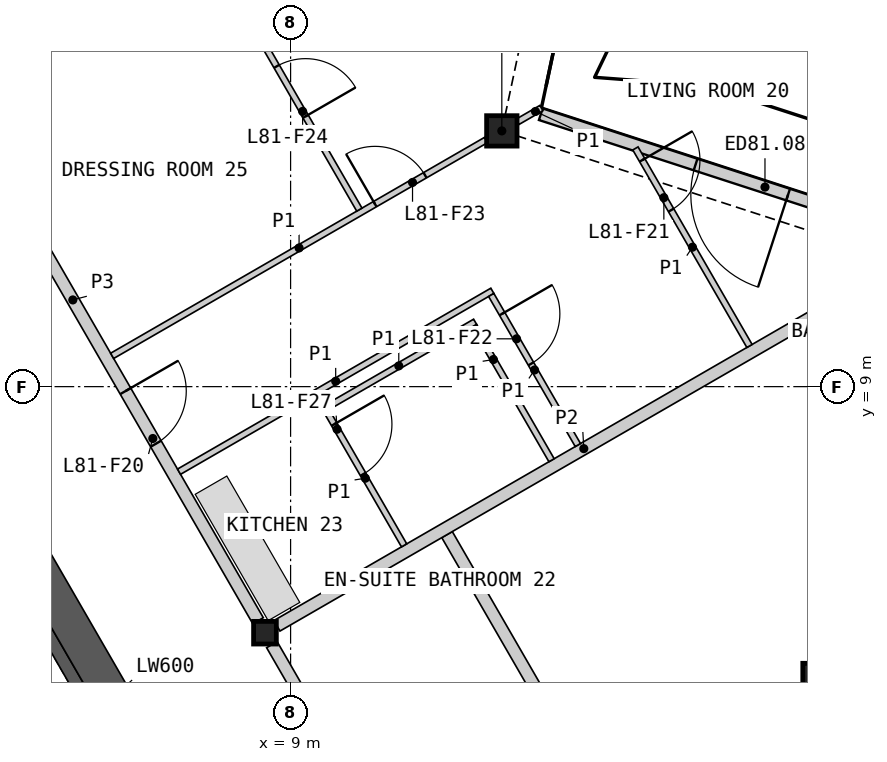
"""IFC4 building model, lengths in metres.
Left out: names, types, materials, properties, quantities, classifications, styles, units other than length and angle.
Written with IfcOpenShell. Run it as: python <this file> out.ifc"""

import sys

from ifc_helpers import new_model, si_unit, direction, frame, frame_2d, origin, origin_2d, place, context, subcontext, project, spatial, polyline, rectangle, hollow_rectangle, i_section, outline, extrude, element, fill, save


model = new_model("IFC4")
c1 = context("Model", 3, precision=1e-05, world=origin(), true_north=direction((0.0, 1.0)))
c2 = subcontext(c1, "Body", "Model", "MODEL_VIEW")
j1 = project(units=[si_unit("LENGTHUNIT", "METRE"), si_unit("PLANEANGLEUNIT", "RADIAN")], contexts=[c1])
p1 = place(None, origin())
s1 = spatial("IfcSite", under=j1, at=p1, CompositionType="ELEMENT")
p2 = place(p1, origin())
s2 = spatial("IfcBuilding", under=s1, at=p2, CompositionType="ELEMENT")
p3 = place(p2, frame((0.0, 0.0, 364.4)))
s3 = spatial("IfcBuildingStorey", under=s2, at=p3, CompositionType="ELEMENT", Elevation=364.4)
for number, where, z_axis, x_axis in (
    (1, (17.674, 4.199, 0.0), (0.0, 0.0, 1.0), (1.0, 0.0, 0.0)),
    (2, (12.474, 13.206, 0.0), (0.0, 0.0, 1.0), (1.0, 0.0, 0.0)),
):
    element("IfcColumn", number, at=place(p3, frame(where, z_axis=z_axis, x_axis=x_axis)), inside=s3, PredefinedType="COLUMN", context=c2, shape_type="SweptSolid", body=[
        extrude(hollow_rectangle(XDim=0.5, YDim=0.5, WallThickness=0.03, at=origin_2d()), origin(), (0.0, 0.0, 1.0), 3.4),
    ])
p4 = place(p3, frame((8.578, 4.953, 0.0), z_axis=(0.0, 0.0, 1.0), x_axis=(1.0, 0.0, 0.0)))
e3 = element("IfcColumn", 3, at=p4, inside=s3, PredefinedType="COLUMN", context=c2, shape_type="SweptSolid", body=[
    extrude(i_section(OverallWidth=0.374, OverallDepth=0.372, WebThickness=0.016, FlangeThickness=0.026, at=origin_2d()), origin(), (0.0, 0.0, 1.0), 3.4),
])
p5 = place(p3, frame((19.467, 11.416, 0.0), z_axis=(0.0, 0.0, 1.0), x_axis=(-0.951057706878, 0.309013330114, 0.0)))
e4 = element("IfcWall", 4, at=p5, inside=s3, PredefinedType="SOLIDWALL", context=c2, shape_type="SweptSolid", body=[
    extrude(rectangle(XDim=6.678, YDim=0.2, at=frame_2d((3.339, 0.0))), origin(), (0.0, 0.0, 1.0), 2.634),
])
p6 = place(p5, frame((2.402, 0.0, 0.0)))
e5 = element("IfcOpeningElement", 5, at=p6, cuts=e4, PredefinedType="OPENING", context=c2, shape_type="SweptSolid", body=[
    extrude(rectangle(XDim=1.6, YDim=2.25, at=frame_2d((0.8, 1.125))), frame((0.0, 0.11, 0.0), z_axis=(0.0, -1.0, 0.0), x_axis=(1.0, 0.0, 0.0)), (0.0, 0.0, 1.0), 0.22),
])
p7 = place(p3, origin())
e6 = element("IfcWall", 6, at=p7, inside=s3, PredefinedType="SHEAR", context=c2, shape_type="SweptSolid", body=[
    extrude(outline(polyline([(1.561, 6.097), (3.731, 7.35), (8.231, -0.444), (6.061, -1.697), (5.96, -1.524), (7.952, -0.374), (6.952, 1.358), (4.96, 0.208), (4.861, 0.381), (6.852, 1.531), (5.852, 3.263), (3.861, 2.113), (3.76, 2.287), (5.752, 3.437), (4.752, 5.169), (2.76, 4.019), (2.66, 4.192), (4.652, 5.342), (3.652, 7.074), (1.66, 5.924), (1.561, 6.097)])), origin(), (0.0, 0.0, 1.0), 3.1),
])
p8 = place(p3, frame((5.817, -1.476, 0.0), z_axis=(0.0, 0.0, 1.0), x_axis=(-0.500002616675, 0.866023893041, 0.0)))
e7 = element("IfcWall", 7, at=p8, inside=s3, PredefinedType="SOLIDWALL", context=c2, shape_type="SweptSolid", body=[
    extrude(rectangle(XDim=8.373, YDim=0.2, at=frame_2d((4.187, 0.0))), origin(), (0.0, 0.0, 1.0), 3.1),
])
p9 = place(p8, frame((0.337, 0.0, 0.0)))
e8 = element("IfcOpeningElement", 8, at=p9, cuts=e7, PredefinedType="OPENING", context=c2, shape_type="SweptSolid", body=[
    extrude(rectangle(XDim=1.1, YDim=2.1, at=frame_2d((0.55, 1.05))), frame((0.0, 0.11, 0.0), z_axis=(0.0, -1.0, 0.0), x_axis=(1.0, 0.0, 0.0)), (0.0, 0.0, 1.0), 0.22),
])
p10 = place(p8, frame((2.537, 0.0, 0.0)))
e9 = element("IfcOpeningElement", 9, at=p10, cuts=e7, PredefinedType="OPENING", context=c2, shape_type="SweptSolid", body=[
    extrude(rectangle(XDim=1.1, YDim=2.1, at=frame_2d((0.55, 1.05))), frame((0.0, 0.11, 0.0), z_axis=(0.0, -1.0, 0.0), x_axis=(1.0, 0.0, 0.0)), (0.0, 0.0, 1.0), 0.22),
])
p11 = place(p8, frame((4.737, 0.0, 0.0)))
e10 = element("IfcOpeningElement", 10, at=p11, cuts=e7, PredefinedType="OPENING", context=c2, shape_type="SweptSolid", body=[
    extrude(rectangle(XDim=1.1, YDim=2.1, at=frame_2d((0.55, 1.05))), frame((0.0, 0.11, 0.0), z_axis=(0.0, -1.0, 0.0), x_axis=(1.0, 0.0, 0.0)), (0.0, 0.0, 1.0), 0.22),
])
p12 = place(p8, frame((7.037, 0.0, 0.0)))
e11 = element("IfcOpeningElement", 11, at=p12, cuts=e7, PredefinedType="OPENING", context=c2, shape_type="SweptSolid", body=[
    extrude(rectangle(XDim=0.9, YDim=2.1, at=frame_2d((0.45, 1.05))), frame((0.0, 0.11, 0.0), z_axis=(0.0, -1.0, 0.0), x_axis=(1.0, 0.0, 0.0)), (0.0, 0.0, 1.0), 0.22),
])
p13 = place(p3, frame((8.686, -0.634, 0.0), z_axis=(0.0, 0.0, 1.0), x_axis=(-0.50001836461, 0.866014800712, 0.0)))
e12 = element("IfcWall", 12, at=p13, inside=s3, PredefinedType="SHEAR", context=c2, shape_type="SweptSolid", body=[
    extrude(rectangle(XDim=10.451, YDim=0.6, at=frame_2d((5.225, 0.0))), origin(), (0.0, 0.0, 1.0), 3.1),
])
p14 = place(p3, frame((4.403, 12.185, 0.0), z_axis=(0.0, 0.0, 1.0), x_axis=(0.499992155518, -0.866029932751, 0.0)))
e13 = element("IfcWall", 13, at=p14, inside=s3, PredefinedType="PARTITIONING", context=c2, shape_type="SweptSolid", body=[
    extrude(rectangle(XDim=8.123, YDim=0.2, at=frame_2d((4.062, 0.0))), origin(), (0.0, 0.0, 1.0), 3.1),
])
p15 = place(p14, frame((3.762, 0.0, 0.0)))
e14 = element("IfcOpeningElement", 14, at=p15, cuts=e13, PredefinedType="OPENING", context=c2, shape_type="SweptSolid", body=[
    extrude(rectangle(XDim=1.0, YDim=2.1, at=frame_2d((0.5, 1.05))), frame((0.0, 0.11, 0.0), z_axis=(0.0, -1.0, 0.0), x_axis=(1.0, 0.0, 0.0)), (0.0, 0.0, 1.0), 0.22),
])
p16 = place(p3, frame((8.692, 4.756, 0.0), z_axis=(0.0, 0.0, 1.0), x_axis=(0.500001682468, -0.866024432409, 0.0)))
e15 = element("IfcWall", 15, at=p16, inside=s3, PredefinedType="PARTITIONING", context=c2, shape_type="SweptSolid", body=[
    extrude(rectangle(XDim=8.124, YDim=0.2, at=frame_2d((4.062, 0.0))), origin(), (0.0, 0.0, 1.0), 3.1),
])
p17 = place(p16, frame((3.587, 0.0, 0.0)))
e16 = element("IfcOpeningElement", 16, at=p17, cuts=e15, PredefinedType="OPENING", context=c2, shape_type="SweptSolid", body=[
    extrude(rectangle(XDim=0.95, YDim=2.1, at=frame_2d((0.475, 1.05))), frame((0.0, 0.11, 0.0), z_axis=(0.0, -1.0, 0.0), x_axis=(1.0, 0.0, 0.0)), (0.0, 0.0, 1.0), 0.22),
])
p18 = place(p3, frame((11.573, 6.566, 0.0), z_axis=(0.0, 0.0, 1.0), x_axis=(0.499993542657, -0.866029131901, 0.0)))
e17 = element("IfcWall", 17, at=p18, inside=s3, PredefinedType="PARTITIONING", context=c2, shape_type="SweptSolid", body=[
    extrude(rectangle(XDim=14.994, YDim=0.2, at=frame_2d((7.497, 0.0))), origin(), (0.0, 0.0, 1.0), 2.33),
])
p19 = place(p18, frame((5.166, 0.0, 0.0)))
e18 = element("IfcOpeningElement", 18, at=p19, cuts=e17, PredefinedType="OPENING", context=c2, shape_type="SweptSolid", body=[
    extrude(rectangle(XDim=0.95, YDim=2.1, at=frame_2d((0.475, 1.05))), frame((0.0, 0.11, 0.0), z_axis=(0.0, -1.0, 0.0), x_axis=(1.0, 0.0, 0.0)), (0.0, 0.0, 1.0), 0.22),
])
p20 = place(p3, frame((8.775, 5.066, 0.0), z_axis=(0.0, 0.0, 1.0), x_axis=(0.866023724155, 0.500002909193, 0.0)))
e19 = element("IfcWall", 19, at=p20, inside=s3, PredefinedType="PARTITIONING", context=c2, shape_type="SweptSolid", body=[
    extrude(rectangle(XDim=11.655, YDim=0.2, at=frame_2d((5.827, 0.0))), origin(), (0.0, 0.0, 1.0), 2.33),
])
p21 = place(p3, frame((3.465, 14.01, 0.0), z_axis=(0.0, 0.0, 1.0), x_axis=(0.866032376801, 0.499987922186, 0.0)))
e20 = element("IfcWall", 20, at=p21, inside=s3, PredefinedType="PARTITIONING", context=c2, shape_type="SweptSolid", body=[
    extrude(rectangle(XDim=11.782, YDim=0.1, at=frame_2d((5.891, 0.0))), origin(), (0.0, 0.0, 1.0), 2.33),
])
p22 = place(p21, frame((6.67, 0.0, 0.0)))
e21 = element("IfcOpeningElement", 21, at=p22, cuts=e20, PredefinedType="OPENING", context=c2, shape_type="SweptSolid", body=[
    extrude(rectangle(XDim=0.95, YDim=2.1, at=frame_2d((0.475, 1.05))), frame((0.0, 0.06, 0.0), z_axis=(0.0, -1.0, 0.0), x_axis=(1.0, 0.0, 0.0)), (0.0, 0.0, 1.0), 0.12),
])
p23 = place(p3, frame((6.065, 9.506, 0.0), z_axis=(0.0, 0.0, 1.0), x_axis=(0.866018949465, 0.500011179042, 0.0)))
e22 = element("IfcWall", 22, at=p23, inside=s3, PredefinedType="PARTITIONING", context=c2, shape_type="SweptSolid", body=[
    extrude(rectangle(XDim=7.1, YDim=0.1, at=frame_2d((3.55, 0.0))), origin(), (0.0, 0.0, 1.0), 2.33),
])
p24 = place(p23, frame((4.992, 0.0, 0.0)))
e23 = element("IfcOpeningElement", 23, at=p24, cuts=e22, PredefinedType="OPENING", context=c2, shape_type="SweptSolid", body=[
    extrude(rectangle(XDim=0.95, YDim=2.1, at=frame_2d((0.475, 1.05))), frame((0.0, 0.06, 0.0), z_axis=(0.0, -1.0, 0.0), x_axis=(1.0, 0.0, 0.0)), (0.0, 0.0, 1.0), 0.12),
])
p25 = place(p3, frame((7.165, 7.601, 0.0), z_axis=(0.0, 0.0, 1.0), x_axis=(0.866017493347, 0.500013701029, 0.0)))
e24 = element("IfcWall", 24, at=p25, inside=s3, PredefinedType="PARTITIONING", context=c2, shape_type="SweptSolid", body=[
    extrude(rectangle(XDim=5.95, YDim=0.1, at=frame_2d((2.975, 0.0))), origin(), (0.0, 0.0, 1.0), 2.33),
])
p26 = place(p3, frame((7.581, 16.328, 0.0), z_axis=(0.0, 0.0, 1.0), x_axis=(0.500005610874, -0.86602216432, 0.0)))
e25 = element("IfcWall", 25, at=p26, inside=s3, PredefinedType="PARTITIONING", context=c2, shape_type="SweptSolid", body=[
    extrude(rectangle(XDim=5.1, YDim=0.1, at=frame_2d((2.55, 0.0))), origin(), (0.0, 0.0, 1.0), 2.33),
])
p27 = place(p26, frame((2.379, 0.0, 0.0)))
e26 = element("IfcOpeningElement", 26, at=p27, cuts=e25, PredefinedType="OPENING", context=c2, shape_type="SweptSolid", body=[
    extrude(rectangle(XDim=0.95, YDim=2.1, at=frame_2d((0.475, 1.05))), frame((0.0, 0.06, 0.0), z_axis=(0.0, -1.0, 0.0), x_axis=(1.0, 0.0, 0.0)), (0.0, 0.0, 1.0), 0.12),
])
p28 = place(p3, frame((14.671, 12.918, 0.0), z_axis=(0.0, 0.0, 1.0), x_axis=(0.499981580887, -0.866036037803, 0.0)))
e27 = element("IfcWall", 27, at=p28, inside=s3, PredefinedType="PARTITIONING", context=c2, shape_type="SweptSolid", body=[
    extrude(rectangle(XDim=3.752, YDim=0.1, at=frame_2d((1.876, 0.0))), origin(), (0.0, 0.0, 1.0), 2.33),
])
p29 = place(p28, frame((0.222, 0.0, 0.0)))
e28 = element("IfcOpeningElement", 28, at=p29, cuts=e27, PredefinedType="OPENING", context=c2, shape_type="SweptSolid", body=[
    extrude(rectangle(XDim=0.95, YDim=2.1, at=frame_2d((0.475, 1.05))), frame((0.0, 0.06, 0.0), z_axis=(0.0, -1.0, 0.0), x_axis=(1.0, 0.0, 0.0)), (0.0, 0.0, 1.0), 0.12),
])
p30 = place(p3, frame((12.3, 10.508, 0.0), z_axis=(0.0, 0.0, 1.0), x_axis=(0.499999279071, -0.866025820012, 0.0)))
e29 = element("IfcWall", 29, at=p30, inside=s3, PredefinedType="PARTITIONING", context=c2, shape_type="SweptSolid", body=[
    extrude(rectangle(XDim=2.85, YDim=0.1, at=frame_2d((1.425, 0.0))), origin(), (0.0, 0.0, 1.0), 2.33),
])
p31 = place(p30, frame((0.358, 0.0, 0.0)))
e30 = element("IfcOpeningElement", 30, at=p31, cuts=e29, PredefinedType="OPENING", context=c2, shape_type="SweptSolid", body=[
    extrude(rectangle(XDim=0.95, YDim=2.1, at=frame_2d((0.475, 1.05))), frame((0.0, 0.06, 0.0), z_axis=(0.0, -1.0, 0.0), x_axis=(1.0, 0.0, 0.0)), (0.0, 0.0, 1.0), 0.12),
])
p32 = place(p3, frame((9.523, 8.616, 0.0), z_axis=(0.0, 0.0, 1.0), x_axis=(0.866032775405, 0.499987231761, 0.0)))
e31 = element("IfcWall", 31, at=p32, inside=s3, PredefinedType="PARTITIONING", context=c2, shape_type="SweptSolid", body=[
    extrude(rectangle(XDim=2.9, YDim=0.1, at=frame_2d((1.45, 0.0))), origin(), (0.0, 0.0, 1.0), 2.33),
])
p33 = place(p3, frame((12.017, 9.998, 0.0), z_axis=(0.0, 0.0, 1.0), x_axis=(0.499948979701, -0.866054858364, 0.0)))
e32 = element("IfcWall", 32, at=p33, inside=s3, PredefinedType="PARTITIONING", context=c2, shape_type="SweptSolid", body=[
    extrude(rectangle(XDim=2.55, YDim=0.1, at=frame_2d((1.275, 0.0))), origin(), (0.0, 0.0, 1.0), 2.33),
])
p34 = place(p3, frame((9.592, 8.598, 0.0), z_axis=(0.0, 0.0, 1.0), x_axis=(0.499990435942, -0.866030925526, 0.0)))
e33 = element("IfcWall", 33, at=p34, inside=s3, PredefinedType="PARTITIONING", context=c2, shape_type="SweptSolid", body=[
    extrude(rectangle(XDim=2.55, YDim=0.1, at=frame_2d((1.275, 0.0))), origin(), (0.0, 0.0, 1.0), 2.33),
])
p35 = place(p34, frame((0.25, 0.0, 0.0)))
e34 = element("IfcOpeningElement", 34, at=p35, cuts=e33, PredefinedType="OPENING", context=c2, shape_type="SweptSolid", body=[
    extrude(rectangle(XDim=0.95, YDim=2.1, at=frame_2d((0.475, 1.05))), frame((0.0, 0.06, 0.0), z_axis=(0.0, -1.0, 0.0), x_axis=(1.0, 0.0, 0.0)), (0.0, 0.0, 1.0), 0.12),
])
p36 = place(p3, frame((12.734, 13.356, 0.0), z_axis=(0.0, 0.0, 1.0), x_axis=(0.865870279271, 0.500268587336, 0.0)))
e35 = element("IfcWall", 35, at=p36, inside=s3, PredefinedType="PARTITIONING", context=c2, shape_type="SweptSolid", body=[
    extrude(rectangle(XDim=0.451, YDim=0.1, at=frame_2d((0.226, 0.0))), origin(), (0.0, 0.0, 1.0), 2.33),
])
p37 = place(p6, origin())
e36 = element("IfcDoor", 36, at=p37, inside=s3, OperationType="DOUBLE_DOOR_SINGLE_SWING", PredefinedType="DOOR", context=c2, shape_type="SweptSolid", body=[
    extrude(rectangle(XDim=1.6, YDim=2.25, at=frame_2d((0.8, 1.125))), frame((0.0, 0.025, 0.0), z_axis=(0.0, -1.0, 0.0), x_axis=(1.0, 0.0, 0.0)), (0.0, 0.0, 1.0), 0.05),
])
fill(e5, e36)
p38 = place(p15, origin())
e37 = element("IfcDoor", 37, at=p38, inside=s3, OperationType="SINGLE_SWING_LEFT", PredefinedType="DOOR", context=c2, shape_type="SweptSolid", body=[
    extrude(rectangle(XDim=1.0, YDim=2.1, at=frame_2d((0.5, 1.05))), frame((0.0, 0.025, 0.0), z_axis=(0.0, -1.0, 0.0), x_axis=(1.0, 0.0, 0.0)), (0.0, 0.0, 1.0), 0.05),
])
fill(e14, e37)
p39 = place(p29, origin())
e38 = element("IfcDoor", 38, at=p39, inside=s3, OperationType="SINGLE_SWING_LEFT", PredefinedType="DOOR", context=c2, shape_type="SweptSolid", body=[
    extrude(rectangle(XDim=0.95, YDim=2.1, at=frame_2d((0.475, 1.05))), frame((0.0, 0.025, 0.0), z_axis=(0.0, -1.0, 0.0), x_axis=(1.0, 0.0, 0.0)), (0.0, 0.0, 1.0), 0.05),
])
fill(e28, e38)
p40 = place(p31, origin())
e39 = element("IfcDoor", 39, at=p40, inside=s3, OperationType="SINGLE_SWING_LEFT", PredefinedType="DOOR", context=c2, shape_type="SweptSolid", body=[
    extrude(rectangle(XDim=0.95, YDim=2.1, at=frame_2d((0.475, 1.05))), frame((0.0, 0.025, 0.0), z_axis=(0.0, -1.0, 0.0), x_axis=(1.0, 0.0, 0.0)), (0.0, 0.0, 1.0), 0.05),
])
fill(e30, e39)
p41 = place(p24, origin())
e40 = element("IfcDoor", 40, at=p41, inside=s3, OperationType="SINGLE_SWING_LEFT", PredefinedType="DOOR", context=c2, shape_type="SweptSolid", body=[
    extrude(rectangle(XDim=0.95, YDim=2.1, at=frame_2d((0.475, 1.05))), frame((0.0, 0.025, 0.0), z_axis=(0.0, -1.0, 0.0), x_axis=(1.0, 0.0, 0.0)), (0.0, 0.0, 1.0), 0.05),
])
fill(e23, e40)
p42 = place(p27, origin())
e41 = element("IfcDoor", 41, at=p42, inside=s3, OperationType="SINGLE_SWING_RIGHT", PredefinedType="DOOR", context=c2, shape_type="SweptSolid", body=[
    extrude(rectangle(XDim=0.95, YDim=2.1, at=frame_2d((0.475, 1.05))), frame((0.0, 0.025, 0.0), z_axis=(0.0, -1.0, 0.0), x_axis=(1.0, 0.0, 0.0)), (0.0, 0.0, 1.0), 0.05),
])
fill(e26, e41)
p43 = place(p35, origin())
e42 = element("IfcDoor", 42, at=p43, inside=s3, OperationType="SINGLE_SWING_LEFT", PredefinedType="DOOR", context=c2, shape_type="SweptSolid", body=[
    extrude(rectangle(XDim=0.95, YDim=2.1, at=frame_2d((0.475, 1.05))), frame((0.0, 0.025, 0.0), z_axis=(0.0, -1.0, 0.0), x_axis=(1.0, 0.0, 0.0)), (0.0, 0.0, 1.0), 0.05),
])
fill(e34, e42)
save(model, sys.argv[1])
